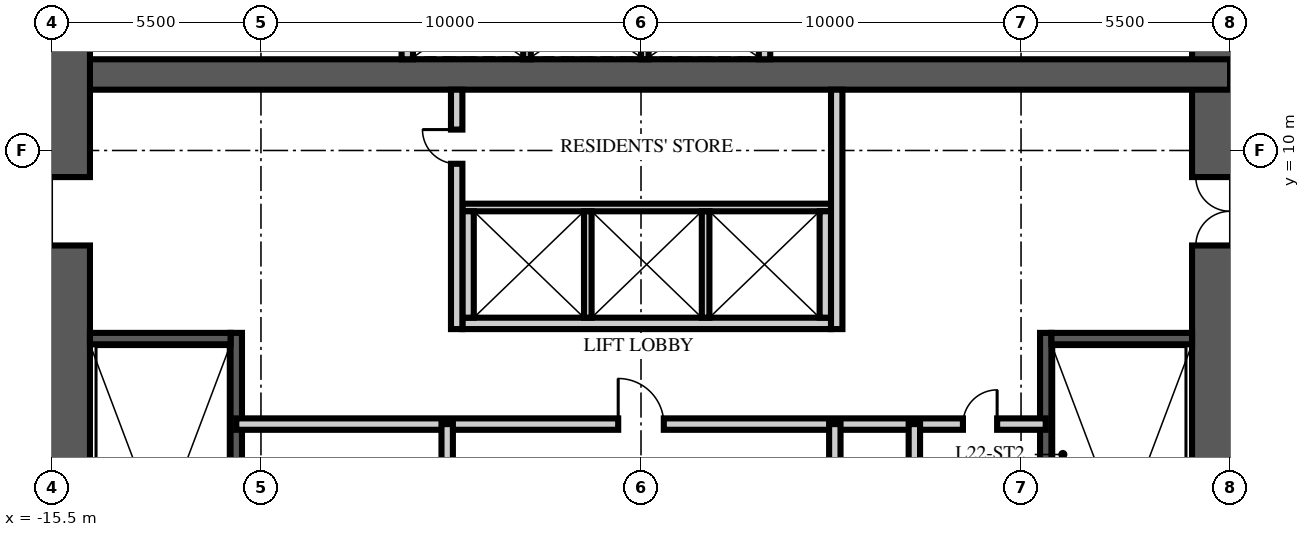
"""IFC4 building model, lengths in metres.
Left out: names, types, materials, properties, quantities, classifications, styles, units other than length and angle.
Written with IfcOpenShell. Run it as: python <this file> out.ifc"""

import sys

from ifc_helpers import new_model, si_unit, direction, frame, frame_2d, origin, place, context, subcontext, project, spatial, rectangle, extrude, element, fill, save


model = new_model("IFC4")
c1 = context("Model", 3, precision=1e-05, world=origin(), true_north=direction((0.0, 1.0)))
c2 = subcontext(c1, "Body", "Model", "MODEL_VIEW")
j1 = project(units=[si_unit("LENGTHUNIT", "METRE"), si_unit("PLANEANGLEUNIT", "RADIAN")], contexts=[c1])
p1 = place(None, origin())
s1 = spatial("IfcSite", under=j1, at=p1, CompositionType="ELEMENT")
p2 = place(p1, origin())
s2 = spatial("IfcBuilding", under=s1, at=p2, CompositionType="ELEMENT")
p3 = place(p2, frame((0.0, 0.0, 88.5)))
s3 = spatial("IfcBuildingStorey", under=s2, at=p3, CompositionType="ELEMENT", Elevation=88.5)
p4 = place(p3, frame((15.5, -15.5, -0.25), z_axis=(0.0, 0.0, 1.0), x_axis=(0.0, 1.0, 0.0)))
e1 = element("IfcWall", 1, at=p4, inside=s3, PredefinedType="SHEAR", context=c2, shape_type="SweptSolid", body=[
    extrude(rectangle(XDim=31.0, YDim=2.0, at=frame_2d((15.5, 0.0))), origin(), (0.0, 0.0, 1.0), 3.75),
])
p5 = place(p4, frame((6.5, 0.0, 0.25)))
e2 = element("IfcOpeningElement", 2, at=p5, cuts=e1, PredefinedType="OPENING", context=c2, shape_type="SweptSolid", body=[
    extrude(rectangle(XDim=1.2, YDim=2.1, at=frame_2d((0.6, 1.05))), frame((0.0, 1.01, 0.0), z_axis=(0.0, -1.0, 0.0), x_axis=(1.0, 0.0, 0.0)), (0.0, 0.0, 1.0), 2.02),
])
p6 = place(p4, frame((23.0, 0.0, 0.25)))
e3 = element("IfcOpeningElement", 3, at=p6, cuts=e1, PredefinedType="OPENING", context=c2, shape_type="SweptSolid", body=[
    extrude(rectangle(XDim=1.8, YDim=2.1, at=frame_2d((0.9, 1.05))), frame((0.0, 1.01, 0.0), z_axis=(0.0, -1.0, 0.0), x_axis=(1.0, 0.0, 0.0)), (0.0, 0.0, 1.0), 2.02),
])
p7 = place(p3, frame((-15.5, 12.0, -0.25), z_axis=(0.0, 0.0, 1.0), x_axis=(1.0, 0.0, 0.0)))
e4 = element("IfcWall", 4, at=p7, inside=s3, PredefinedType="SHEAR", context=c2, shape_type="SweptSolid", body=[
    extrude(rectangle(XDim=31.0, YDim=0.8, at=frame_2d((15.5, 0.0))), origin(), (0.0, 0.0, 1.0), 3.75),
])
p8 = place(p3, frame((-15.5, -15.5, -0.25), z_axis=(0.0, 0.0, 1.0), x_axis=(0.0, 1.0, 0.0)))
e5 = element("IfcWall", 5, at=p8, inside=s3, PredefinedType="SHEAR", context=c2, shape_type="SweptSolid", body=[
    extrude(rectangle(XDim=31.0, YDim=2.0, at=frame_2d((15.5, 0.0))), origin(), (0.0, 0.0, 1.0), 3.75),
])
p9 = place(p8, frame((6.5, 0.0, 0.25)))
e6 = element("IfcOpeningElement", 6, at=p9, cuts=e5, PredefinedType="OPENING", context=c2, shape_type="SweptSolid", body=[
    extrude(rectangle(XDim=1.2, YDim=2.1, at=frame_2d((0.6, 1.05))), frame((0.0, 1.01, 0.0), z_axis=(0.0, -1.0, 0.0), x_axis=(1.0, 0.0, 0.0)), (0.0, 0.0, 1.0), 2.02),
])
p10 = place(p8, frame((23.0, 0.0, 0.25)))
e7 = element("IfcOpeningElement", 7, at=p10, cuts=e5, PredefinedType="OPENING", context=c2, shape_type="SweptSolid", body=[
    extrude(rectangle(XDim=1.8, YDim=2.1, at=frame_2d((0.9, 1.05))), frame((0.0, 1.01, 0.0), z_axis=(0.0, -1.0, 0.0), x_axis=(1.0, 0.0, 0.0)), (0.0, 0.0, 1.0), 2.02),
])
p11 = place(p3, frame((-10.65, -4.9, 0.0), z_axis=(0.0, 0.0, 1.0), x_axis=(0.0, 1.0, 0.0)))
e8 = element("IfcWall", 8, at=p11, inside=s3, PredefinedType="SOLIDWALL", context=c2, shape_type="SweptSolid", body=[
    extrude(rectangle(XDim=10.1, YDim=0.3, at=frame_2d((5.05, 0.0))), origin(), (0.0, 0.0, 1.0), 3.5),
])
p12 = place(p3, frame((-14.5, 5.05, 0.0), z_axis=(0.0, 0.0, 1.0), x_axis=(1.0, 0.0, 0.0)))
e9 = element("IfcWall", 9, at=p12, inside=s3, PredefinedType="SOLIDWALL", context=c2, shape_type="SweptSolid", body=[
    extrude(rectangle(XDim=3.7, YDim=0.3, at=frame_2d((1.85, 0.0))), origin(), (0.0, 0.0, 1.0), 3.5),
])
p13 = place(p3, frame((10.65, -4.9, 0.0), z_axis=(0.0, 0.0, 1.0), x_axis=(0.0, 1.0, 0.0)))
e10 = element("IfcWall", 10, at=p13, inside=s3, PredefinedType="SOLIDWALL", context=c2, shape_type="SweptSolid", body=[
    extrude(rectangle(XDim=10.1, YDim=0.3, at=frame_2d((5.05, 0.0))), origin(), (0.0, 0.0, 1.0), 3.5),
])
p14 = place(p3, frame((14.5, 5.05, 0.0), z_axis=(0.0, 0.0, 1.0), x_axis=(-1.0, 0.0, 0.0)))
e11 = element("IfcWall", 11, at=p14, inside=s3, PredefinedType="SOLIDWALL", context=c2, shape_type="SweptSolid", body=[
    extrude(rectangle(XDim=3.7, YDim=0.3, at=frame_2d((1.85, 0.0))), origin(), (0.0, 0.0, 1.0), 3.5),
])
p15 = place(p3, frame((-4.7, 5.45, 0.0), z_axis=(0.0, 0.0, 1.0), x_axis=(1.0, 0.0, 0.0)))
e12 = element("IfcWall", 12, at=p15, inside=s3, PredefinedType="PARTITIONING", context=c2, shape_type="SweptSolid", body=[
    extrude(rectangle(XDim=9.7, YDim=0.3, at=frame_2d((4.85, 0.0))), origin(), (0.0, 0.0, 1.0), 3.5),
])
p16 = place(p3, frame((-4.7, 8.5, 0.0), z_axis=(0.0, 0.0, 1.0), x_axis=(1.0, 0.0, 0.0)))
e13 = element("IfcWall", 13, at=p16, inside=s3, PredefinedType="PARTITIONING", context=c2, shape_type="SweptSolid", body=[
    extrude(rectangle(XDim=9.7, YDim=0.2, at=frame_2d((4.85, 0.0))), origin(), (0.0, 0.0, 1.0), 3.5),
])
for number, where, z_axis, x_axis in (
    (14, (-4.55, 5.6, 0.0), (0.0, 0.0, 1.0), (0.0, 1.0, 0.0)),
    (15, (4.85, 5.6, 0.0), (0.0, 0.0, 1.0), (0.0, 1.0, 0.0)),
):
    element("IfcWall", number, at=place(p3, frame(where, z_axis=z_axis, x_axis=x_axis)), inside=s3, PredefinedType="PARTITIONING", context=c2, shape_type="SweptSolid", body=[
        extrude(rectangle(XDim=2.8, YDim=0.3, at=frame_2d((1.4, 0.0))), origin(), (0.0, 0.0, 1.0), 3.5),
    ])
for number, where, z_axis, x_axis in (
    (16, (-1.4, 5.6, 0.0), (0.0, 0.0, 1.0), (0.0, 1.0, 0.0)),
    (17, (1.7, 5.6, 0.0), (0.0, 0.0, 1.0), (0.0, 1.0, 0.0)),
):
    element("IfcWall", number, at=place(p3, frame(where, z_axis=z_axis, x_axis=x_axis)), inside=s3, PredefinedType="PARTITIONING", context=c2, shape_type="SweptSolid", body=[
        extrude(rectangle(XDim=2.8, YDim=0.2, at=frame_2d((1.4, 0.0))), origin(), (0.0, 0.0, 1.0), 3.5),
    ])
for number, where, z_axis, x_axis in (
    (18, (-6.15, 12.4, 0.0), (0.0, 0.0, 1.0), (0.0, 1.0, 0.0)),
    (19, (3.25, 12.4, 0.0), (0.0, 0.0, 1.0), (0.0, 1.0, 0.0)),
):
    element("IfcWall", number, at=place(p3, frame(where, z_axis=z_axis, x_axis=x_axis)), inside=s3, PredefinedType="PARTITIONING", context=c2, shape_type="SweptSolid", body=[
        extrude(rectangle(XDim=2.1, YDim=0.3, at=frame_2d((1.05, 0.0))), origin(), (0.0, 0.0, 1.0), 3.5),
    ])
for number, where, z_axis, x_axis in (
    (20, (-3.0, 12.4, 0.0), (0.0, 0.0, 1.0), (0.0, 1.0, 0.0)),
    (21, (0.1, 12.4, 0.0), (0.0, 0.0, 1.0), (0.0, 1.0, 0.0)),
):
    element("IfcWall", number, at=place(p3, frame(where, z_axis=z_axis, x_axis=x_axis)), inside=s3, PredefinedType="PARTITIONING", context=c2, shape_type="SweptSolid", body=[
        extrude(rectangle(XDim=2.1, YDim=0.2, at=frame_2d((1.05, 0.0))), origin(), (0.0, 0.0, 1.0), 3.5),
    ])
p17 = place(p3, frame((-10.65, 2.8, 0.0), z_axis=(0.0, 0.0, 1.0), x_axis=(1.0, 0.0, 0.0)))
e22 = element("IfcWall", 22, at=p17, inside=s3, PredefinedType="PARTITIONING", context=c2, shape_type="SweptSolid", body=[
    extrude(rectangle(XDim=21.3, YDim=0.3, at=frame_2d((10.65, 0.0))), origin(), (0.0, 0.0, 1.0), 3.5),
])
p18 = place(p17, frame((10.05, 0.0, 0.0)))
e23 = element("IfcOpeningElement", 23, at=p18, cuts=e22, PredefinedType="OPENING", context=c2, shape_type="SweptSolid", body=[
    extrude(rectangle(XDim=1.2, YDim=2.1, at=frame_2d((0.6, 1.05))), frame((0.0, 0.16, 0.0), z_axis=(0.0, -1.0, 0.0), x_axis=(1.0, 0.0, 0.0)), (0.0, 0.0, 1.0), 0.32),
])
p19 = place(p17, frame((19.121, 0.0, 0.0)))
e24 = element("IfcOpeningElement", 24, at=p19, cuts=e22, PredefinedType="OPENING", context=c2, shape_type="SweptSolid", body=[
    extrude(rectangle(XDim=0.9, YDim=2.1, at=frame_2d((0.45, 1.05))), frame((0.0, 0.16, 0.0), z_axis=(0.0, -1.0, 0.0), x_axis=(1.0, 0.0, 0.0)), (0.0, 0.0, 1.0), 0.32),
])
p20 = place(p3, frame((-5.1, -6.65, 0.0), z_axis=(0.0, 0.0, 1.0), x_axis=(0.0, 1.0, 0.0)))
e25 = element("IfcWall", 25, at=p20, inside=s3, PredefinedType="PARTITIONING", context=c2, shape_type="SweptSolid", body=[
    extrude(rectangle(XDim=9.45, YDim=0.3, at=frame_2d((4.725, 0.0))), origin(), (0.0, 0.0, 1.0), 3.5),
])
p21 = place(p20, frame((2.648, 0.0, 0.0)))
e26 = element("IfcOpeningElement", 26, at=p21, cuts=e25, PredefinedType="OPENING", context=c2, shape_type="SweptSolid", body=[
    extrude(rectangle(XDim=0.9, YDim=2.1, at=frame_2d((0.45, 1.05))), frame((0.0, 0.16, 0.0), z_axis=(0.0, -1.0, 0.0), x_axis=(1.0, 0.0, 0.0)), (0.0, 0.0, 1.0), 0.32),
])
p22 = place(p20, frame((7.373, 0.0, 0.0)))
e27 = element("IfcOpeningElement", 27, at=p22, cuts=e25, PredefinedType="OPENING", context=c2, shape_type="SweptSolid", body=[
    extrude(rectangle(XDim=0.9, YDim=2.1, at=frame_2d((0.45, 1.05))), frame((0.0, 0.16, 0.0), z_axis=(0.0, -1.0, 0.0), x_axis=(1.0, 0.0, 0.0)), (0.0, 0.0, 1.0), 0.32),
])
p23 = place(p3, frame((5.1, -6.65, 0.0), z_axis=(0.0, 0.0, 1.0), x_axis=(0.0, 1.0, 0.0)))
e28 = element("IfcWall", 28, at=p23, inside=s3, PredefinedType="PARTITIONING", context=c2, shape_type="SweptSolid", body=[
    extrude(rectangle(XDim=9.45, YDim=0.3, at=frame_2d((4.725, 0.0))), origin(), (0.0, 0.0, 1.0), 3.5),
])
p24 = place(p23, frame((4.275, 0.0, 0.0)))
e29 = element("IfcOpeningElement", 29, at=p24, cuts=e28, PredefinedType="OPENING", context=c2, shape_type="SweptSolid", body=[
    extrude(rectangle(XDim=0.9, YDim=2.1, at=frame_2d((0.45, 1.05))), frame((0.0, 0.16, 0.0), z_axis=(0.0, -1.0, 0.0), x_axis=(1.0, 0.0, 0.0)), (0.0, 0.0, 1.0), 0.32),
])
p25 = place(p3, frame((7.193, -6.65, 0.0), z_axis=(0.0, 0.0, 1.0), x_axis=(0.0, 1.0, 0.0)))
e30 = element("IfcWall", 30, at=p25, inside=s3, PredefinedType="PARTITIONING", context=c2, shape_type="SweptSolid", body=[
    extrude(rectangle(XDim=9.45, YDim=0.3, at=frame_2d((4.725, 0.0))), origin(), (0.0, 0.0, 1.0), 3.5),
])
p26 = place(p3, frame((-4.85, 5.3, 0.0), z_axis=(0.0, 0.0, 1.0), x_axis=(0.0, 1.0, 0.0)))
e31 = element("IfcWall", 31, at=p26, inside=s3, PredefinedType="PARTITIONING", context=c2, shape_type="SweptSolid", body=[
    extrude(rectangle(XDim=6.3, YDim=0.3, at=frame_2d((3.15, 0.0))), origin(), (0.0, 0.0, 1.0), 3.5),
])
p27 = place(p26, frame((4.35, 0.0, 0.0)))
e32 = element("IfcOpeningElement", 32, at=p27, cuts=e31, PredefinedType="OPENING", context=c2, shape_type="SweptSolid", body=[
    extrude(rectangle(XDim=0.9, YDim=2.1, at=frame_2d((0.45, 1.05))), frame((0.0, 0.16, 0.0), z_axis=(0.0, -1.0, 0.0), x_axis=(1.0, 0.0, 0.0)), (0.0, 0.0, 1.0), 0.32),
])
p28 = place(p3, frame((5.15, 5.3, 0.0), z_axis=(0.0, 0.0, 1.0), x_axis=(0.0, 1.0, 0.0)))
e33 = element("IfcWall", 33, at=p28, inside=s3, PredefinedType="PARTITIONING", context=c2, shape_type="SweptSolid", body=[
    extrude(rectangle(XDim=6.3, YDim=0.3, at=frame_2d((3.15, 0.0))), origin(), (0.0, 0.0, 1.0), 3.5),
])
p29 = place(p10, origin())
e34 = element("IfcDoor", 34, at=p29, inside=s3, OperationType="DOUBLE_DOOR_SINGLE_SWING", PredefinedType="DOOR", context=c2, shape_type="SweptSolid", body=[
    extrude(rectangle(XDim=1.8, YDim=2.1, at=frame_2d((0.9, 1.05))), frame((0.0, 0.025, 0.0), z_axis=(0.0, -1.0, 0.0), x_axis=(1.0, 0.0, 0.0)), (0.0, 0.0, 1.0), 0.05),
])
fill(e7, e34)
p30 = place(p6, origin())
e35 = element("IfcDoor", 35, at=p30, inside=s3, OperationType="DOUBLE_DOOR_SINGLE_SWING", PredefinedType="DOOR", context=c2, shape_type="SweptSolid", body=[
    extrude(rectangle(XDim=1.8, YDim=2.1, at=frame_2d((0.9, 1.05))), frame((0.0, 0.025, 0.0), z_axis=(0.0, -1.0, 0.0), x_axis=(1.0, 0.0, 0.0)), (0.0, 0.0, 1.0), 0.05),
])
fill(e3, e35)
p31 = place(p18, origin())
e36 = element("IfcDoor", 36, at=p31, inside=s3, OperationType="SINGLE_SWING_LEFT", PredefinedType="DOOR", context=c2, shape_type="SweptSolid", body=[
    extrude(rectangle(XDim=1.2, YDim=2.1, at=frame_2d((0.6, 1.05))), frame((0.0, 0.025, 0.0), z_axis=(0.0, -1.0, 0.0), x_axis=(1.0, 0.0, 0.0)), (0.0, 0.0, 1.0), 0.05),
])
fill(e23, e36)
p32 = place(p19, origin())
e37 = element("IfcDoor", 37, at=p32, inside=s3, OperationType="SINGLE_SWING_RIGHT", PredefinedType="DOOR", context=c2, shape_type="SweptSolid", body=[
    extrude(rectangle(XDim=0.9, YDim=2.1, at=frame_2d((0.45, 1.05))), frame((0.0, 0.025, 0.0), z_axis=(0.0, -1.0, 0.0), x_axis=(1.0, 0.0, 0.0)), (0.0, 0.0, 1.0), 0.05),
])
fill(e24, e37)
p33 = place(p27, origin())
e38 = element("IfcDoor", 38, at=p33, inside=s3, OperationType="SINGLE_SWING_RIGHT", PredefinedType="DOOR", context=c2, shape_type="SweptSolid", body=[
    extrude(rectangle(XDim=0.9, YDim=2.1, at=frame_2d((0.45, 1.05))), frame((0.0, 0.025, 0.0), z_axis=(0.0, -1.0, 0.0), x_axis=(1.0, 0.0, 0.0)), (0.0, 0.0, 1.0), 0.05),
])
fill(e32, e38)
save(model, sys.argv[1])
